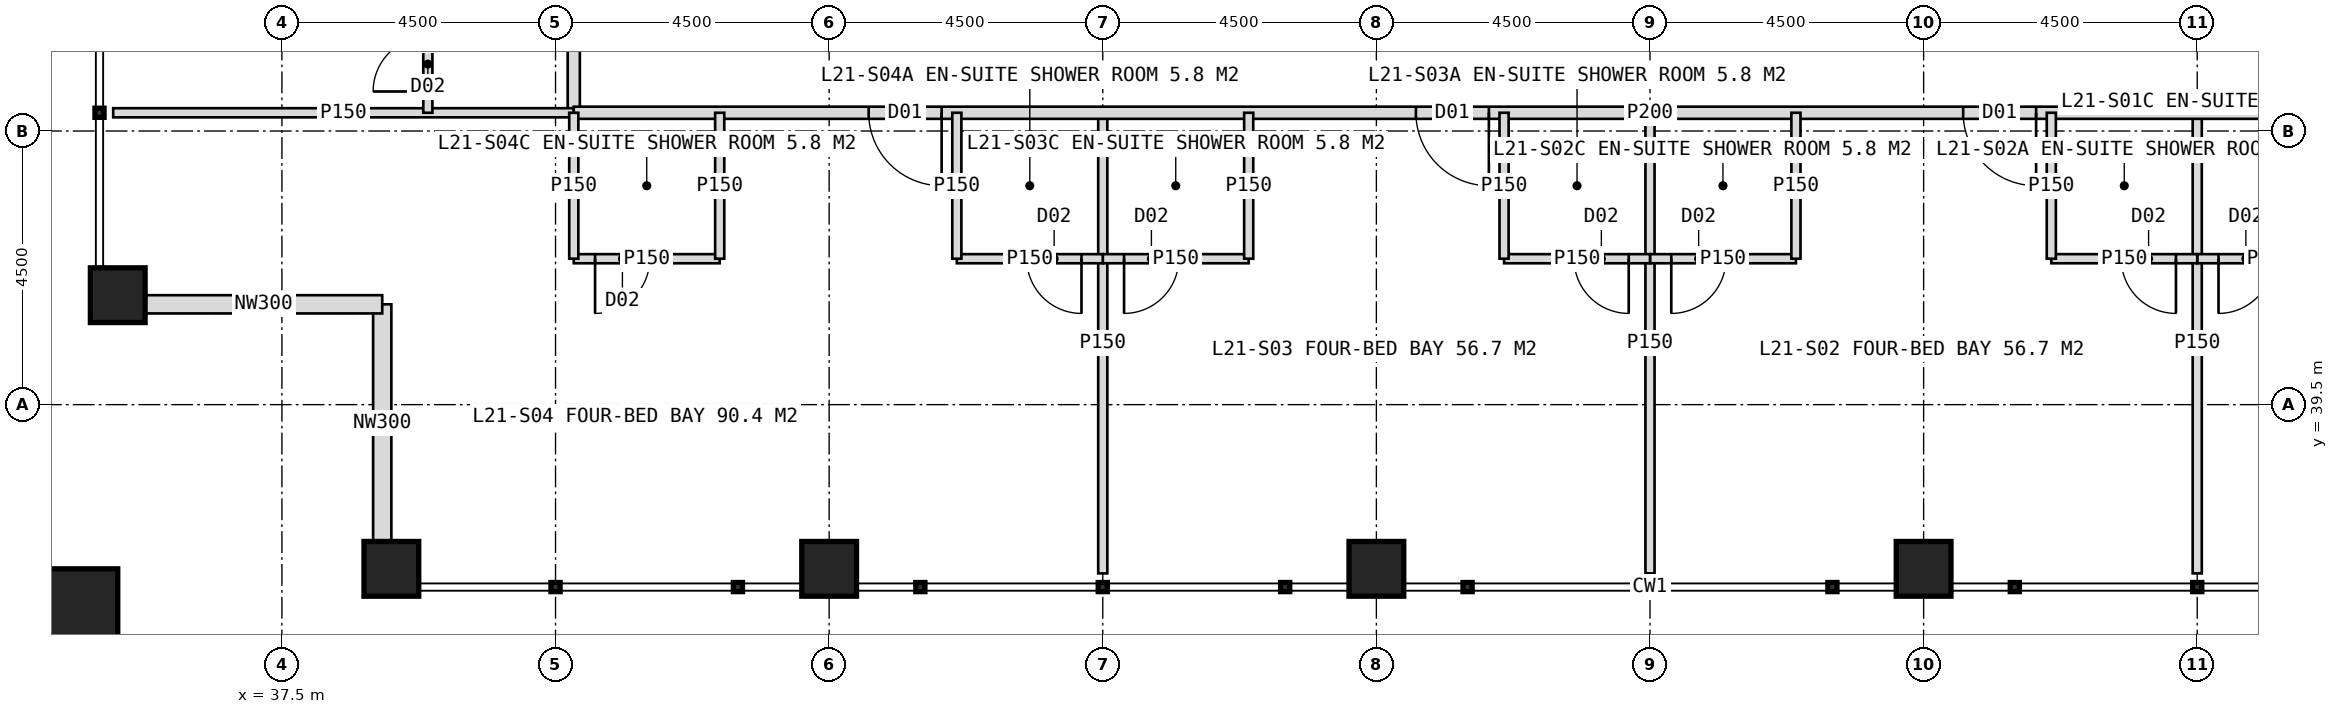
"""IFC4 building model, lengths in metres.
Left out: names, types, materials, properties, quantities, classifications, styles, units other than length and angle.
Written with IfcOpenShell. Run it as: python <this file> out.ifc"""

import sys

from ifc_helpers import new_model, si_unit, direction, frame, frame_2d, origin, origin_2d, place, context, subcontext, project, spatial, rectangle, hollow_rectangle, extrude, element, fill, save


model = new_model("IFC4")
c1 = context("Model", 3, precision=1e-05, world=origin(), true_north=direction((0.0, 1.0)))
c2 = subcontext(c1, "Body", "Model", "MODEL_VIEW")
j1 = project(units=[si_unit("LENGTHUNIT", "METRE"), si_unit("PLANEANGLEUNIT", "RADIAN")], contexts=[c1])
p1 = place(None, origin())
s1 = spatial("IfcSite", under=j1, at=p1, CompositionType="ELEMENT")
p2 = place(p1, origin())
s2 = spatial("IfcBuilding", under=s1, at=p2, CompositionType="ELEMENT")
p3 = place(p2, frame((0.0, 0.0, 91.0)))
s3 = spatial("IfcBuildingStorey", under=s2, at=p3, CompositionType="ELEMENT", Elevation=91.0)
for number, where, z_axis, x_axis in (
    (1, (39.3, 36.8, 0.0), (0.0, 0.0, 1.0), (1.0, 0.0, 0.0)),
    (2, (34.8, 41.3, 0.0), (0.0, 0.0, 1.0), (1.0, 0.0, 0.0)),
    (3, (46.5, 36.8, 0.0), (0.0, 0.0, 1.0), (1.0, 0.0, 0.0)),
    (4, (55.5, 36.8, 0.0), (0.0, 0.0, 1.0), (1.0, 0.0, 0.0)),
    (5, (64.5, 36.8, 0.0), (0.0, 0.0, 1.0), (1.0, 0.0, 0.0)),
):
    element("IfcColumn", number, at=place(p3, frame(where, z_axis=z_axis, x_axis=x_axis)), inside=s3, PredefinedType="COLUMN", context=c2, shape_type="SweptSolid", body=[
        extrude(hollow_rectangle(XDim=0.9, YDim=0.9, WallThickness=0.08, at=origin_2d()), origin(), (0.0, 0.0, 1.0), 4.0),
    ])
p4 = place(p3, frame((33.9, 35.9, 0.0), z_axis=(0.0, 0.0, 1.0), x_axis=(1.0, 0.0, 0.0)))
e6 = element("IfcColumn", 6, at=p4, inside=s3, PredefinedType="COLUMN", context=c2, shape_type="SweptSolid", body=[
    extrude(hollow_rectangle(XDim=1.8, YDim=1.8, WallThickness=0.1, at=origin_2d()), origin(), (0.0, 0.0, 1.0), 2.0),
])
for number, where, z_axis, x_axis in (
    (7, (39.15, 37.25, 0.0), (0.0, 0.0, 1.0), (0.0, 1.0, 0.0)),
    (8, (39.15, 41.15, 0.0), (0.0, 0.0, 1.0), (-1.0, 0.0, 0.0)),
):
    element("IfcWall", number, at=place(p3, frame(where, z_axis=z_axis, x_axis=x_axis)), inside=s3, PredefinedType="ELEMENTEDWALL", context=c2, shape_type="SweptSolid", body=[
        extrude(rectangle(XDim=3.9, YDim=0.3, at=frame_2d((1.95, 0.0))), origin(), (0.0, 0.0, 1.0), 2.95),
    ])
p5 = place(p3, frame((42.3, 44.3, 0.0), z_axis=(0.0, 0.0, 1.0), x_axis=(0.0, 1.0, 0.0)))
e9 = element("IfcWall", 9, at=p5, inside=s3, PredefinedType="PARTITIONING", context=c2, shape_type="SweptSolid", body=[
    extrude(rectangle(XDim=35.4, YDim=0.2, at=frame_2d((17.7, 0.0))), origin(), (0.0, 0.0, 1.0), 3.75),
])
p6 = place(p5, frame((2.65, 0.0, 0.0)))
e10 = element("IfcOpeningElement", 10, at=p6, cuts=e9, PredefinedType="OPENING", context=c2, shape_type="SweptSolid", body=[
    extrude(rectangle(XDim=1.2, YDim=2.2, at=frame_2d((0.6, 1.1))), frame((0.0, 0.11, 0.0), z_axis=(0.0, -1.0, 0.0), x_axis=(1.0, 0.0, 0.0)), (0.0, 0.0, 1.0), 0.22),
])
p7 = place(p5, frame((11.35, 0.0, 0.0)))
e11 = element("IfcOpeningElement", 11, at=p7, cuts=e9, PredefinedType="OPENING", context=c2, shape_type="SweptSolid", body=[
    extrude(rectangle(XDim=1.2, YDim=2.2, at=frame_2d((0.6, 1.1))), frame((0.0, 0.11, 0.0), z_axis=(0.0, -1.0, 0.0), x_axis=(1.0, 0.0, 0.0)), (0.0, 0.0, 1.0), 0.22),
])
p8 = place(p5, frame((20.35, 0.0, 0.0)))
e12 = element("IfcOpeningElement", 12, at=p8, cuts=e9, PredefinedType="OPENING", context=c2, shape_type="SweptSolid", body=[
    extrude(rectangle(XDim=1.2, YDim=2.2, at=frame_2d((0.6, 1.1))), frame((0.0, 0.11, 0.0), z_axis=(0.0, -1.0, 0.0), x_axis=(1.0, 0.0, 0.0)), (0.0, 0.0, 1.0), 0.22),
])
p9 = place(p5, frame((26.35, 0.0, 0.0)))
e13 = element("IfcOpeningElement", 13, at=p9, cuts=e9, PredefinedType="OPENING", context=c2, shape_type="SweptSolid", body=[
    extrude(rectangle(XDim=1.2, YDim=2.2, at=frame_2d((0.6, 1.1))), frame((0.0, 0.11, 0.0), z_axis=(0.0, -1.0, 0.0), x_axis=(1.0, 0.0, 0.0)), (0.0, 0.0, 1.0), 0.22),
])
p10 = place(p5, frame((30.85, 0.0, 0.0)))
e14 = element("IfcOpeningElement", 14, at=p10, cuts=e9, PredefinedType="OPENING", context=c2, shape_type="SweptSolid", body=[
    extrude(rectangle(XDim=1.2, YDim=2.2, at=frame_2d((0.6, 1.1))), frame((0.0, 0.11, 0.0), z_axis=(0.0, -1.0, 0.0), x_axis=(1.0, 0.0, 0.0)), (0.0, 0.0, 1.0), 0.22),
])
p11 = place(p3, frame((42.3, 44.3, 0.0), z_axis=(0.0, 0.0, 1.0), x_axis=(-1.0, 0.0, 0.0)))
e15 = element("IfcWall", 15, at=p11, inside=s3, PredefinedType="PARTITIONING", context=c2, shape_type="SweptSolid", body=[
    extrude(rectangle(XDim=7.575, YDim=0.15, at=frame_2d((3.788, 0.0))), origin(), (0.0, 0.0, 1.0), 3.75),
])
p12 = place(p3, frame((39.9, 44.3, 0.0), z_axis=(0.0, 0.0, 1.0), x_axis=(0.0, 1.0, 0.0)))
e16 = element("IfcWall", 16, at=p12, inside=s3, PredefinedType="PARTITIONING", context=c2, shape_type="SweptSolid", body=[
    extrude(rectangle(XDim=2.4, YDim=0.15, at=frame_2d((1.2, 0.0))), origin(), (0.0, 0.0, 1.0), 3.75),
])
p13 = place(p12, frame((0.35, 0.0, 0.0)))
e17 = element("IfcOpeningElement", 17, at=p13, cuts=e16, PredefinedType="OPENING", context=c2, shape_type="SweptSolid", body=[
    extrude(rectangle(XDim=0.9, YDim=2.1, at=frame_2d((0.45, 1.05))), frame((0.0, 0.085, 0.0), z_axis=(0.0, -1.0, 0.0), x_axis=(1.0, 0.0, 0.0)), (0.0, 0.0, 1.0), 0.17),
])
p14 = place(p3, frame((69.0, 44.3, 0.0), z_axis=(0.0, 0.0, 1.0), x_axis=(0.0, -1.0, 0.0)))
e18 = element("IfcWall", 18, at=p14, inside=s3, PredefinedType="PARTITIONING", context=c2, shape_type="SweptSolid", body=[
    extrude(rectangle(XDim=7.575, YDim=0.15, at=frame_2d((3.788, 0.0))), origin(), (0.0, 0.0, 1.0), 3.75),
])
p15 = place(p3, frame((60.0, 44.3, 0.0), z_axis=(0.0, 0.0, 1.0), x_axis=(0.0, -1.0, 0.0)))
e19 = element("IfcWall", 19, at=p15, inside=s3, PredefinedType="PARTITIONING", context=c2, shape_type="SweptSolid", body=[
    extrude(rectangle(XDim=7.575, YDim=0.15, at=frame_2d((3.788, 0.0))), origin(), (0.0, 0.0, 1.0), 2.75),
])
p16 = place(p3, frame((51.0, 44.3, 0.0), z_axis=(0.0, 0.0, 1.0), x_axis=(0.0, -1.0, 0.0)))
e20 = element("IfcWall", 20, at=p16, inside=s3, PredefinedType="PARTITIONING", context=c2, shape_type="SweptSolid", body=[
    extrude(rectangle(XDim=7.575, YDim=0.15, at=frame_2d((3.788, 0.0))), origin(), (0.0, 0.0, 1.0), 3.75),
])
p17 = place(p3, frame((77.7, 44.3, 0.0), z_axis=(0.0, 0.0, 1.0), x_axis=(-1.0, 0.0, 0.0)))
e21 = element("IfcWall", 21, at=p17, inside=s3, PredefinedType="PARTITIONING", context=c2, shape_type="SweptSolid", body=[
    extrude(rectangle(XDim=35.4, YDim=0.2, at=frame_2d((17.7, 0.0))), origin(), (0.0, 0.0, 1.0), 3.75),
])
p18 = place(p17, frame((2.65, 0.0, 0.0)))
e22 = element("IfcOpeningElement", 22, at=p18, cuts=e21, PredefinedType="OPENING", context=c2, shape_type="SweptSolid", body=[
    extrude(rectangle(XDim=1.2, YDim=2.2, at=frame_2d((0.6, 1.1))), frame((0.0, 0.11, 0.0), z_axis=(0.0, -1.0, 0.0), x_axis=(1.0, 0.0, 0.0)), (0.0, 0.0, 1.0), 0.22),
])
p19 = place(p17, frame((11.35, 0.0, 0.0)))
e23 = element("IfcOpeningElement", 23, at=p19, cuts=e21, PredefinedType="OPENING", context=c2, shape_type="SweptSolid", body=[
    extrude(rectangle(XDim=1.2, YDim=2.2, at=frame_2d((0.6, 1.1))), frame((0.0, 0.11, 0.0), z_axis=(0.0, -1.0, 0.0), x_axis=(1.0, 0.0, 0.0)), (0.0, 0.0, 1.0), 0.22),
])
p20 = place(p17, frame((20.35, 0.0, 0.0)))
e24 = element("IfcOpeningElement", 24, at=p20, cuts=e21, PredefinedType="OPENING", context=c2, shape_type="SweptSolid", body=[
    extrude(rectangle(XDim=1.2, YDim=2.2, at=frame_2d((0.6, 1.1))), frame((0.0, 0.11, 0.0), z_axis=(0.0, -1.0, 0.0), x_axis=(1.0, 0.0, 0.0)), (0.0, 0.0, 1.0), 0.22),
])
p21 = place(p17, frame((29.35, 0.0, 0.0)))
e25 = element("IfcOpeningElement", 25, at=p21, cuts=e21, PredefinedType="OPENING", context=c2, shape_type="SweptSolid", body=[
    extrude(rectangle(XDim=1.2, YDim=2.2, at=frame_2d((0.6, 1.1))), frame((0.0, 0.11, 0.0), z_axis=(0.0, -1.0, 0.0), x_axis=(1.0, 0.0, 0.0)), (0.0, 0.0, 1.0), 0.22),
])
p22 = place(p3, frame((71.4, 41.9, 0.0), z_axis=(0.0, 0.0, 1.0), x_axis=(-1.0, 0.0, 0.0)))
e26 = element("IfcWall", 26, at=p22, inside=s3, PredefinedType="PARTITIONING", context=c2, shape_type="SweptSolid", body=[
    extrude(rectangle(XDim=2.4, YDim=0.15, at=frame_2d((1.2, 0.0))), origin(), (0.0, 0.0, 1.0), 3.75),
])
p23 = place(p22, frame((1.15, 0.0, 0.0)))
e27 = element("IfcOpeningElement", 27, at=p23, cuts=e26, PredefinedType="OPENING", context=c2, shape_type="SweptSolid", body=[
    extrude(rectangle(XDim=0.9, YDim=2.1, at=frame_2d((0.45, 1.05))), frame((0.0, 0.085, 0.0), z_axis=(0.0, -1.0, 0.0), x_axis=(1.0, 0.0, 0.0)), (0.0, 0.0, 1.0), 0.17),
])
p24 = place(p3, frame((69.0, 41.9, 0.0), z_axis=(0.0, 0.0, 1.0), x_axis=(-1.0, 0.0, 0.0)))
e28 = element("IfcWall", 28, at=p24, inside=s3, PredefinedType="PARTITIONING", context=c2, shape_type="SweptSolid", body=[
    extrude(rectangle(XDim=2.4, YDim=0.15, at=frame_2d((1.2, 0.0))), origin(), (0.0, 0.0, 1.0), 3.75),
])
p25 = place(p24, frame((0.35, 0.0, 0.0)))
e29 = element("IfcOpeningElement", 29, at=p25, cuts=e28, PredefinedType="OPENING", context=c2, shape_type="SweptSolid", body=[
    extrude(rectangle(XDim=0.9, YDim=2.1, at=frame_2d((0.45, 1.05))), frame((0.0, 0.085, 0.0), z_axis=(0.0, -1.0, 0.0), x_axis=(1.0, 0.0, 0.0)), (0.0, 0.0, 1.0), 0.17),
])
p26 = place(p3, frame((66.6, 44.3, 0.0), z_axis=(0.0, 0.0, 1.0), x_axis=(0.0, -1.0, 0.0)))
e30 = element("IfcWall", 30, at=p26, inside=s3, PredefinedType="PARTITIONING", context=c2, shape_type="SweptSolid", body=[
    extrude(rectangle(XDim=2.4, YDim=0.15, at=frame_2d((1.2, 0.0))), origin(), (0.0, 0.0, 1.0), 3.75),
])
p27 = place(p3, frame((62.4, 41.9, 0.0), z_axis=(0.0, 0.0, 1.0), x_axis=(-1.0, 0.0, 0.0)))
e31 = element("IfcWall", 31, at=p27, inside=s3, PredefinedType="PARTITIONING", context=c2, shape_type="SweptSolid", body=[
    extrude(rectangle(XDim=2.4, YDim=0.15, at=frame_2d((1.2, 0.0))), origin(), (0.0, 0.0, 1.0), 3.75),
])
p28 = place(p27, frame((1.15, 0.0, 0.0)))
e32 = element("IfcOpeningElement", 32, at=p28, cuts=e31, PredefinedType="OPENING", context=c2, shape_type="SweptSolid", body=[
    extrude(rectangle(XDim=0.9, YDim=2.1, at=frame_2d((0.45, 1.05))), frame((0.0, 0.085, 0.0), z_axis=(0.0, -1.0, 0.0), x_axis=(1.0, 0.0, 0.0)), (0.0, 0.0, 1.0), 0.17),
])
p29 = place(p3, frame((62.4, 44.3, 0.0), z_axis=(0.0, 0.0, 1.0), x_axis=(0.0, -1.0, 0.0)))
e33 = element("IfcWall", 33, at=p29, inside=s3, PredefinedType="PARTITIONING", context=c2, shape_type="SweptSolid", body=[
    extrude(rectangle(XDim=2.4, YDim=0.15, at=frame_2d((1.2, 0.0))), origin(), (0.0, 0.0, 1.0), 3.75),
])
p30 = place(p3, frame((60.0, 41.9, 0.0), z_axis=(0.0, 0.0, 1.0), x_axis=(-1.0, 0.0, 0.0)))
e34 = element("IfcWall", 34, at=p30, inside=s3, PredefinedType="PARTITIONING", context=c2, shape_type="SweptSolid", body=[
    extrude(rectangle(XDim=2.4, YDim=0.15, at=frame_2d((1.2, 0.0))), origin(), (0.0, 0.0, 1.0), 3.75),
])
p31 = place(p30, frame((0.35, 0.0, 0.0)))
e35 = element("IfcOpeningElement", 35, at=p31, cuts=e34, PredefinedType="OPENING", context=c2, shape_type="SweptSolid", body=[
    extrude(rectangle(XDim=0.9, YDim=2.1, at=frame_2d((0.45, 1.05))), frame((0.0, 0.085, 0.0), z_axis=(0.0, -1.0, 0.0), x_axis=(1.0, 0.0, 0.0)), (0.0, 0.0, 1.0), 0.17),
])
p32 = place(p3, frame((57.6, 44.3, 0.0), z_axis=(0.0, 0.0, 1.0), x_axis=(0.0, -1.0, 0.0)))
e36 = element("IfcWall", 36, at=p32, inside=s3, PredefinedType="PARTITIONING", context=c2, shape_type="SweptSolid", body=[
    extrude(rectangle(XDim=2.4, YDim=0.15, at=frame_2d((1.2, 0.0))), origin(), (0.0, 0.0, 1.0), 3.75),
])
p33 = place(p3, frame((53.4, 41.9, 0.0), z_axis=(0.0, 0.0, 1.0), x_axis=(-1.0, 0.0, 0.0)))
e37 = element("IfcWall", 37, at=p33, inside=s3, PredefinedType="PARTITIONING", context=c2, shape_type="SweptSolid", body=[
    extrude(rectangle(XDim=2.4, YDim=0.15, at=frame_2d((1.2, 0.0))), origin(), (0.0, 0.0, 1.0), 3.75),
])
p34 = place(p33, frame((1.15, 0.0, 0.0)))
e38 = element("IfcOpeningElement", 38, at=p34, cuts=e37, PredefinedType="OPENING", context=c2, shape_type="SweptSolid", body=[
    extrude(rectangle(XDim=0.9, YDim=2.1, at=frame_2d((0.45, 1.05))), frame((0.0, 0.085, 0.0), z_axis=(0.0, -1.0, 0.0), x_axis=(1.0, 0.0, 0.0)), (0.0, 0.0, 1.0), 0.17),
])
p35 = place(p3, frame((53.4, 44.3, 0.0), z_axis=(0.0, 0.0, 1.0), x_axis=(0.0, -1.0, 0.0)))
e39 = element("IfcWall", 39, at=p35, inside=s3, PredefinedType="PARTITIONING", context=c2, shape_type="SweptSolid", body=[
    extrude(rectangle(XDim=2.4, YDim=0.15, at=frame_2d((1.2, 0.0))), origin(), (0.0, 0.0, 1.0), 3.75),
])
p36 = place(p3, frame((51.0, 41.9, 0.0), z_axis=(0.0, 0.0, 1.0), x_axis=(-1.0, 0.0, 0.0)))
e40 = element("IfcWall", 40, at=p36, inside=s3, PredefinedType="PARTITIONING", context=c2, shape_type="SweptSolid", body=[
    extrude(rectangle(XDim=2.4, YDim=0.15, at=frame_2d((1.2, 0.0))), origin(), (0.0, 0.0, 1.0), 3.75),
])
p37 = place(p36, frame((0.35, 0.0, 0.0)))
e41 = element("IfcOpeningElement", 41, at=p37, cuts=e40, PredefinedType="OPENING", context=c2, shape_type="SweptSolid", body=[
    extrude(rectangle(XDim=0.9, YDim=2.1, at=frame_2d((0.45, 1.05))), frame((0.0, 0.085, 0.0), z_axis=(0.0, -1.0, 0.0), x_axis=(1.0, 0.0, 0.0)), (0.0, 0.0, 1.0), 0.17),
])
p38 = place(p3, frame((48.6, 44.3, 0.0), z_axis=(0.0, 0.0, 1.0), x_axis=(0.0, -1.0, 0.0)))
e42 = element("IfcWall", 42, at=p38, inside=s3, PredefinedType="PARTITIONING", context=c2, shape_type="SweptSolid", body=[
    extrude(rectangle(XDim=2.4, YDim=0.15, at=frame_2d((1.2, 0.0))), origin(), (0.0, 0.0, 1.0), 3.75),
])
p39 = place(p3, frame((44.7, 41.9, 0.0), z_axis=(0.0, 0.0, 1.0), x_axis=(-1.0, 0.0, 0.0)))
e43 = element("IfcWall", 43, at=p39, inside=s3, PredefinedType="PARTITIONING", context=c2, shape_type="SweptSolid", body=[
    extrude(rectangle(XDim=2.4, YDim=0.15, at=frame_2d((1.2, 0.0))), origin(), (0.0, 0.0, 1.0), 3.75),
])
p40 = place(p39, frame((1.15, 0.0, 0.0)))
e44 = element("IfcOpeningElement", 44, at=p40, cuts=e43, PredefinedType="OPENING", context=c2, shape_type="SweptSolid", body=[
    extrude(rectangle(XDim=0.9, YDim=2.1, at=frame_2d((0.45, 1.05))), frame((0.0, 0.085, 0.0), z_axis=(0.0, -1.0, 0.0), x_axis=(1.0, 0.0, 0.0)), (0.0, 0.0, 1.0), 0.17),
])
for number, where, z_axis, x_axis in (
    (45, (44.7, 44.3, 0.0), (0.0, 0.0, 1.0), (0.0, -1.0, 0.0)),
    (46, (42.3, 44.3, 0.0), (0.0, 0.0, 1.0), (0.0, -1.0, 0.0)),
):
    element("IfcWall", number, at=place(p3, frame(where, z_axis=z_axis, x_axis=x_axis)), inside=s3, PredefinedType="PARTITIONING", context=c2, shape_type="SweptSolid", body=[
        extrude(rectangle(XDim=2.4, YDim=0.15, at=frame_2d((1.2, 0.0))), origin(), (0.0, 0.0, 1.0), 3.75),
    ])
p41 = place(p13, origin())
e47 = element("IfcDoor", 47, at=p41, inside=s3, OperationType="SINGLE_SWING_LEFT", PredefinedType="DOOR", context=c2, shape_type="SweptSolid", body=[
    extrude(rectangle(XDim=0.9, YDim=2.1, at=frame_2d((0.45, 1.05))), frame((0.0, 0.025, 0.0), z_axis=(0.0, -1.0, 0.0), x_axis=(1.0, 0.0, 0.0)), (0.0, 0.0, 1.0), 0.05),
])
fill(e17, e47)
p42 = place(p23, origin())
e48 = element("IfcDoor", 48, at=p42, inside=s3, OperationType="SINGLE_SWING_RIGHT", PredefinedType="DOOR", context=c2, shape_type="SweptSolid", body=[
    extrude(rectangle(XDim=0.9, YDim=2.1, at=frame_2d((0.45, 1.05))), frame((0.0, 0.025, 0.0), z_axis=(0.0, -1.0, 0.0), x_axis=(1.0, 0.0, 0.0)), (0.0, 0.0, 1.0), 0.05),
])
fill(e27, e48)
p43 = place(p19, origin())
e49 = element("IfcDoor", 49, at=p43, inside=s3, OperationType="SINGLE_SWING_LEFT", PredefinedType="DOOR", context=c2, shape_type="SweptSolid", body=[
    extrude(rectangle(XDim=1.2, YDim=2.2, at=frame_2d((0.6, 1.1))), frame((0.0, 0.025, 0.0), z_axis=(0.0, -1.0, 0.0), x_axis=(1.0, 0.0, 0.0)), (0.0, 0.0, 1.0), 0.05),
])
fill(e23, e49)
p44 = place(p25, origin())
e50 = element("IfcDoor", 50, at=p44, inside=s3, OperationType="SINGLE_SWING_LEFT", PredefinedType="DOOR", context=c2, shape_type="SweptSolid", body=[
    extrude(rectangle(XDim=0.9, YDim=2.1, at=frame_2d((0.45, 1.05))), frame((0.0, 0.025, 0.0), z_axis=(0.0, -1.0, 0.0), x_axis=(1.0, 0.0, 0.0)), (0.0, 0.0, 1.0), 0.05),
])
fill(e29, e50)
p45 = place(p28, origin())
e51 = element("IfcDoor", 51, at=p45, inside=s3, OperationType="SINGLE_SWING_RIGHT", PredefinedType="DOOR", context=c2, shape_type="SweptSolid", body=[
    extrude(rectangle(XDim=0.9, YDim=2.1, at=frame_2d((0.45, 1.05))), frame((0.0, 0.025, 0.0), z_axis=(0.0, -1.0, 0.0), x_axis=(1.0, 0.0, 0.0)), (0.0, 0.0, 1.0), 0.05),
])
fill(e32, e51)
p46 = place(p20, origin())
e52 = element("IfcDoor", 52, at=p46, inside=s3, OperationType="SINGLE_SWING_LEFT", PredefinedType="DOOR", context=c2, shape_type="SweptSolid", body=[
    extrude(rectangle(XDim=1.2, YDim=2.2, at=frame_2d((0.6, 1.1))), frame((0.0, 0.025, 0.0), z_axis=(0.0, -1.0, 0.0), x_axis=(1.0, 0.0, 0.0)), (0.0, 0.0, 1.0), 0.05),
])
fill(e24, e52)
p47 = place(p31, origin())
e53 = element("IfcDoor", 53, at=p47, inside=s3, OperationType="SINGLE_SWING_LEFT", PredefinedType="DOOR", context=c2, shape_type="SweptSolid", body=[
    extrude(rectangle(XDim=0.9, YDim=2.1, at=frame_2d((0.45, 1.05))), frame((0.0, 0.025, 0.0), z_axis=(0.0, -1.0, 0.0), x_axis=(1.0, 0.0, 0.0)), (0.0, 0.0, 1.0), 0.05),
])
fill(e35, e53)
p48 = place(p34, origin())
e54 = element("IfcDoor", 54, at=p48, inside=s3, OperationType="SINGLE_SWING_RIGHT", PredefinedType="DOOR", context=c2, shape_type="SweptSolid", body=[
    extrude(rectangle(XDim=0.9, YDim=2.1, at=frame_2d((0.45, 1.05))), frame((0.0, 0.025, 0.0), z_axis=(0.0, -1.0, 0.0), x_axis=(1.0, 0.0, 0.0)), (0.0, 0.0, 1.0), 0.05),
])
fill(e38, e54)
p49 = place(p21, origin())
e55 = element("IfcDoor", 55, at=p49, inside=s3, OperationType="SINGLE_SWING_LEFT", PredefinedType="DOOR", context=c2, shape_type="SweptSolid", body=[
    extrude(rectangle(XDim=1.2, YDim=2.2, at=frame_2d((0.6, 1.1))), frame((0.0, 0.025, 0.0), z_axis=(0.0, -1.0, 0.0), x_axis=(1.0, 0.0, 0.0)), (0.0, 0.0, 1.0), 0.05),
])
fill(e25, e55)
p50 = place(p37, origin())
e56 = element("IfcDoor", 56, at=p50, inside=s3, OperationType="SINGLE_SWING_LEFT", PredefinedType="DOOR", context=c2, shape_type="SweptSolid", body=[
    extrude(rectangle(XDim=0.9, YDim=2.1, at=frame_2d((0.45, 1.05))), frame((0.0, 0.025, 0.0), z_axis=(0.0, -1.0, 0.0), x_axis=(1.0, 0.0, 0.0)), (0.0, 0.0, 1.0), 0.05),
])
fill(e41, e56)
p51 = place(p40, origin())
e57 = element("IfcDoor", 57, at=p51, inside=s3, OperationType="SINGLE_SWING_RIGHT", PredefinedType="DOOR", context=c2, shape_type="SweptSolid", body=[
    extrude(rectangle(XDim=0.9, YDim=2.1, at=frame_2d((0.45, 1.05))), frame((0.0, 0.025, 0.0), z_axis=(0.0, -1.0, 0.0), x_axis=(1.0, 0.0, 0.0)), (0.0, 0.0, 1.0), 0.05),
])
fill(e44, e57)
save(model, sys.argv[1])
